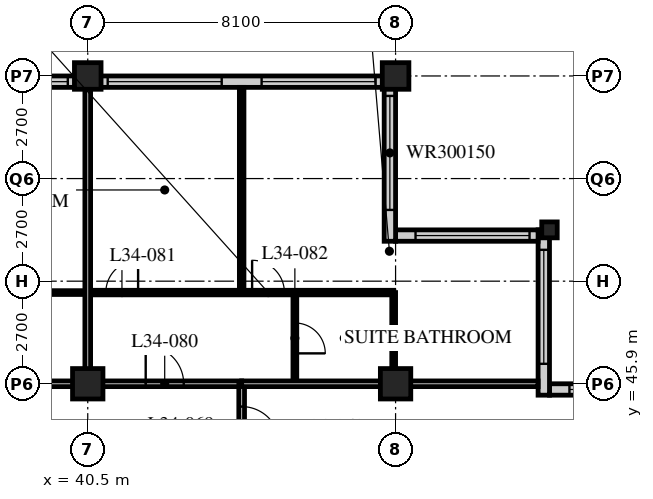
"""IFC4 building model, lengths in metres.
Left out: names, types, materials, properties, quantities, classifications, styles, units other than length and angle.
Written with IfcOpenShell. Run it as: python <this file> out.ifc"""

import sys

from ifc_helpers import new_model, si_unit, direction, frame, frame_2d, origin, origin_2d, place, context, subcontext, project, spatial, rectangle, hollow_rectangle, i_section, extrude, element, fill, save


model = new_model("IFC4")
c1 = context("Model", 3, precision=1e-05, world=origin(), true_north=direction((0.0, 1.0)))
c2 = subcontext(c1, "Body", "Model", "MODEL_VIEW")
j1 = project(units=[si_unit("LENGTHUNIT", "METRE"), si_unit("PLANEANGLEUNIT", "RADIAN")], contexts=[c1])
p1 = place(None, origin())
s1 = spatial("IfcSite", under=j1, at=p1, CompositionType="ELEMENT")
p2 = place(p1, origin())
s2 = spatial("IfcBuilding", under=s1, at=p2, CompositionType="ELEMENT")
p3 = place(p2, frame((0.0, 0.0, 134.0)))
s3 = spatial("IfcBuildingStorey", under=s2, at=p3, CompositionType="ELEMENT", Elevation=134.0)
p4 = place(p3, frame((40.5, 45.9, 0.0), z_axis=(0.0, 0.0, 1.0), x_axis=(1.0, 0.0, 0.0)))
e1 = element("IfcColumn", 1, at=p4, inside=s3, PredefinedType="COLUMN", context=c2, shape_type="SweptSolid", body=[
    extrude(hollow_rectangle(XDim=0.8, YDim=0.8, WallThickness=0.08, at=origin_2d()), origin(), (0.0, 0.0, 1.0), 3.4),
])
p5 = place(p3, frame((40.5, 54.0, 0.0), z_axis=(0.0, 0.0, 1.0), x_axis=(1.0, 0.0, 0.0)))
e2 = element("IfcColumn", 2, at=p5, inside=s3, PredefinedType="COLUMN", context=c2, shape_type="SweptSolid", body=[
    extrude(hollow_rectangle(XDim=0.7, YDim=0.7, WallThickness=0.07, at=origin_2d()), origin(), (0.0, 0.0, 1.0), 3.4),
])
p6 = place(p3, frame((48.6, 45.9, 0.0), z_axis=(0.0, 0.0, 1.0), x_axis=(1.0, 0.0, 0.0)))
e3 = element("IfcColumn", 3, at=p6, inside=s3, PredefinedType="COLUMN", context=c2, shape_type="SweptSolid", body=[
    extrude(hollow_rectangle(XDim=0.8, YDim=0.8, WallThickness=0.08, at=origin_2d()), origin(), (0.0, 0.0, 1.0), 3.4),
])
p7 = place(p3, frame((48.6, 54.0, 0.0), z_axis=(0.0, 0.0, 1.0), x_axis=(1.0, 0.0, 0.0)))
e4 = element("IfcColumn", 4, at=p7, inside=s3, PredefinedType="COLUMN", context=c2, shape_type="SweptSolid", body=[
    extrude(hollow_rectangle(XDim=0.7, YDim=0.7, WallThickness=0.07, at=origin_2d()), origin(), (0.0, 0.0, 1.0), 3.4),
])
p8 = place(p3, frame((52.65, 49.95, 0.0), z_axis=(0.0, 0.0, 1.0), x_axis=(1.0, 0.0, 0.0)))
e5 = element("IfcColumn", 5, at=p8, inside=s3, PredefinedType="COLUMN", context=c2, shape_type="SweptSolid", body=[
    extrude(i_section(OverallWidth=0.407, OverallDepth=0.419, WebThickness=0.031, FlangeThickness=0.049, FilletRadius=0.015, at=origin_2d()), origin(), (0.0, 0.0, 1.0), 3.4),
])
p9 = place(p3, frame((56.4, 45.75, 0.0), z_axis=(0.0, 0.0, 1.0), x_axis=(-1.0, 0.0, 0.0)))
e6 = element("IfcWall", 6, at=p9, inside=s3, PredefinedType="SOLIDWALL", context=c2, shape_type="SweptSolid", body=[
    extrude(rectangle(XDim=3.75, YDim=0.3, at=frame_2d((1.875, 0.0))), origin(), (0.0, 0.0, 1.0), 3.19),
])
p10 = place(p9, frame((0.225, 0.0, 0.9)))
e7 = element("IfcOpeningElement", 7, at=p10, cuts=e6, PredefinedType="OPENING", context=c2, shape_type="SweptSolid", body=[
    extrude(rectangle(XDim=3.0, YDim=1.5, at=frame_2d((1.5, 0.75))), frame((0.0, 0.16, 0.0), z_axis=(0.0, -1.0, 0.0), x_axis=(1.0, 0.0, 0.0)), (0.0, 0.0, 1.0), 0.32),
])
p11 = place(p3, frame((52.5, 45.6, 0.0), z_axis=(0.0, 0.0, 1.0), x_axis=(0.0, 1.0, 0.0)))
e8 = element("IfcWall", 8, at=p11, inside=s3, PredefinedType="SOLIDWALL", context=c2, shape_type="SweptSolid", body=[
    extrude(rectangle(XDim=4.35, YDim=0.3, at=frame_2d((2.175, 0.0))), origin(), (0.0, 0.0, 1.0), 3.19),
])
p12 = place(p11, frame((0.825, 0.0, 0.9)))
e9 = element("IfcOpeningElement", 9, at=p12, cuts=e8, PredefinedType="OPENING", context=c2, shape_type="SweptSolid", body=[
    extrude(rectangle(XDim=3.0, YDim=1.5, at=frame_2d((1.5, 0.75))), frame((0.0, 0.16, 0.0), z_axis=(0.0, -1.0, 0.0), x_axis=(1.0, 0.0, 0.0)), (0.0, 0.0, 1.0), 0.32),
])
p13 = place(p3, frame((52.35, 49.8, 0.0), z_axis=(0.0, 0.0, 1.0), x_axis=(-1.0, 0.0, 0.0)))
e10 = element("IfcWall", 10, at=p13, inside=s3, PredefinedType="SOLIDWALL", context=c2, shape_type="SweptSolid", body=[
    extrude(rectangle(XDim=3.75, YDim=0.3, at=frame_2d((1.875, 0.0))), origin(), (0.0, 0.0, 1.0), 3.19),
])
p14 = place(p13, frame((0.225, 0.0, 0.9)))
e11 = element("IfcOpeningElement", 11, at=p14, cuts=e10, PredefinedType="OPENING", context=c2, shape_type="SweptSolid", body=[
    extrude(rectangle(XDim=3.0, YDim=1.5, at=frame_2d((1.5, 0.75))), frame((0.0, 0.16, 0.0), z_axis=(0.0, -1.0, 0.0), x_axis=(1.0, 0.0, 0.0)), (0.0, 0.0, 1.0), 0.32),
])
p15 = place(p3, frame((48.45, 49.65, 0.0), z_axis=(0.0, 0.0, 1.0), x_axis=(0.0, 1.0, 0.0)))
e12 = element("IfcWall", 12, at=p15, inside=s3, PredefinedType="SOLIDWALL", context=c2, shape_type="SweptSolid", body=[
    extrude(rectangle(XDim=4.35, YDim=0.3, at=frame_2d((2.175, 0.0))), origin(), (0.0, 0.0, 1.0), 3.19),
])
p16 = place(p15, frame((0.825, 0.0, 0.9)))
e13 = element("IfcOpeningElement", 13, at=p16, cuts=e12, PredefinedType="OPENING", context=c2, shape_type="SweptSolid", body=[
    extrude(rectangle(XDim=3.0, YDim=1.5, at=frame_2d((1.5, 0.75))), frame((0.0, 0.16, 0.0), z_axis=(0.0, -1.0, 0.0), x_axis=(1.0, 0.0, 0.0)), (0.0, 0.0, 1.0), 0.32),
])
p17 = place(p3, frame((48.3, 53.85, 0.0), z_axis=(0.0, 0.0, 1.0), x_axis=(-1.0, 0.0, 0.0)))
e14 = element("IfcWall", 14, at=p17, inside=s3, PredefinedType="SOLIDWALL", context=c2, shape_type="SweptSolid", body=[
    extrude(rectangle(XDim=40.2, YDim=0.3, at=frame_2d((20.1, 0.0))), origin(), (0.0, 0.0, 1.0), 3.19),
])
p18 = place(p17, frame((0.225, 0.0, 0.9)))
e15 = element("IfcOpeningElement", 15, at=p18, cuts=e14, PredefinedType="OPENING", context=c2, shape_type="SweptSolid", body=[
    extrude(rectangle(XDim=3.0, YDim=2.0, at=frame_2d((1.5, 1.0))), frame((0.0, 0.16, 0.0), z_axis=(0.0, -1.0, 0.0), x_axis=(1.0, 0.0, 0.0)), (0.0, 0.0, 1.0), 0.32),
])
p19 = place(p17, frame((4.275, 0.0, 0.9)))
e16 = element("IfcOpeningElement", 16, at=p19, cuts=e14, PredefinedType="OPENING", context=c2, shape_type="SweptSolid", body=[
    extrude(rectangle(XDim=3.0, YDim=2.0, at=frame_2d((1.5, 1.0))), frame((0.0, 0.16, 0.0), z_axis=(0.0, -1.0, 0.0), x_axis=(1.0, 0.0, 0.0)), (0.0, 0.0, 1.0), 0.32),
])
p20 = place(p17, frame((8.325, 0.0, 0.9)))
e17 = element("IfcOpeningElement", 17, at=p20, cuts=e14, PredefinedType="OPENING", context=c2, shape_type="SweptSolid", body=[
    extrude(rectangle(XDim=3.0, YDim=2.0, at=frame_2d((1.5, 1.0))), frame((0.0, 0.16, 0.0), z_axis=(0.0, -1.0, 0.0), x_axis=(1.0, 0.0, 0.0)), (0.0, 0.0, 1.0), 0.32),
])
p21 = place(p17, frame((12.375, 0.0, 0.9)))
e18 = element("IfcOpeningElement", 18, at=p21, cuts=e14, PredefinedType="OPENING", context=c2, shape_type="SweptSolid", body=[
    extrude(rectangle(XDim=3.0, YDim=2.0, at=frame_2d((1.5, 1.0))), frame((0.0, 0.16, 0.0), z_axis=(0.0, -1.0, 0.0), x_axis=(1.0, 0.0, 0.0)), (0.0, 0.0, 1.0), 0.32),
])
p22 = place(p17, frame((16.425, 0.0, 0.9)))
e19 = element("IfcOpeningElement", 19, at=p22, cuts=e14, PredefinedType="OPENING", context=c2, shape_type="SweptSolid", body=[
    extrude(rectangle(XDim=3.0, YDim=2.0, at=frame_2d((1.5, 1.0))), frame((0.0, 0.16, 0.0), z_axis=(0.0, -1.0, 0.0), x_axis=(1.0, 0.0, 0.0)), (0.0, 0.0, 1.0), 0.32),
])
p23 = place(p17, frame((20.475, 0.0, 0.9)))
e20 = element("IfcOpeningElement", 20, at=p23, cuts=e14, PredefinedType="OPENING", context=c2, shape_type="SweptSolid", body=[
    extrude(rectangle(XDim=3.0, YDim=2.0, at=frame_2d((1.5, 1.0))), frame((0.0, 0.16, 0.0), z_axis=(0.0, -1.0, 0.0), x_axis=(1.0, 0.0, 0.0)), (0.0, 0.0, 1.0), 0.32),
])
p24 = place(p17, frame((24.525, 0.0, 0.9)))
e21 = element("IfcOpeningElement", 21, at=p24, cuts=e14, PredefinedType="OPENING", context=c2, shape_type="SweptSolid", body=[
    extrude(rectangle(XDim=3.0, YDim=2.0, at=frame_2d((1.5, 1.0))), frame((0.0, 0.16, 0.0), z_axis=(0.0, -1.0, 0.0), x_axis=(1.0, 0.0, 0.0)), (0.0, 0.0, 1.0), 0.32),
])
p25 = place(p17, frame((28.575, 0.0, 0.9)))
e22 = element("IfcOpeningElement", 22, at=p25, cuts=e14, PredefinedType="OPENING", context=c2, shape_type="SweptSolid", body=[
    extrude(rectangle(XDim=3.0, YDim=2.0, at=frame_2d((1.5, 1.0))), frame((0.0, 0.16, 0.0), z_axis=(0.0, -1.0, 0.0), x_axis=(1.0, 0.0, 0.0)), (0.0, 0.0, 1.0), 0.32),
])
p26 = place(p17, frame((32.625, 0.0, 0.9)))
e23 = element("IfcOpeningElement", 23, at=p26, cuts=e14, PredefinedType="OPENING", context=c2, shape_type="SweptSolid", body=[
    extrude(rectangle(XDim=3.0, YDim=2.0, at=frame_2d((1.5, 1.0))), frame((0.0, 0.16, 0.0), z_axis=(0.0, -1.0, 0.0), x_axis=(1.0, 0.0, 0.0)), (0.0, 0.0, 1.0), 0.32),
])
p27 = place(p17, frame((36.675, 0.0, 0.9)))
e24 = element("IfcOpeningElement", 24, at=p27, cuts=e14, PredefinedType="OPENING", context=c2, shape_type="SweptSolid", body=[
    extrude(rectangle(XDim=3.0, YDim=2.0, at=frame_2d((1.5, 1.0))), frame((0.0, 0.16, 0.0), z_axis=(0.0, -1.0, 0.0), x_axis=(1.0, 0.0, 0.0)), (0.0, 0.0, 1.0), 0.32),
])
p28 = place(p3, frame((8.1, 45.9, 0.0), z_axis=(0.0, 0.0, 1.0), x_axis=(1.0, 0.0, 0.0)))
e25 = element("IfcWall", 25, at=p28, inside=s3, PredefinedType="PARTITIONING", context=c2, shape_type="SweptSolid", body=[
    extrude(rectangle(XDim=36.45, YDim=0.15, at=frame_2d((18.225, 0.0))), origin(), (0.0, 0.0, 1.0), 2.578),
])
p29 = place(p28, frame((9.625, 0.0, 0.0)))
e26 = element("IfcOpeningElement", 26, at=p29, cuts=e25, PredefinedType="OPENING", context=c2, shape_type="SweptSolid", body=[
    extrude(rectangle(XDim=1.0, YDim=2.1, at=frame_2d((0.5, 1.05))), frame((0.0, 0.085, 0.0), z_axis=(0.0, -1.0, 0.0), x_axis=(1.0, 0.0, 0.0)), (0.0, 0.0, 1.0), 0.17),
])
p30 = place(p28, frame((21.775, 0.0, 0.0)))
e27 = element("IfcOpeningElement", 27, at=p30, cuts=e25, PredefinedType="OPENING", context=c2, shape_type="SweptSolid", body=[
    extrude(rectangle(XDim=1.0, YDim=2.1, at=frame_2d((0.5, 1.05))), frame((0.0, 0.085, 0.0), z_axis=(0.0, -1.0, 0.0), x_axis=(1.0, 0.0, 0.0)), (0.0, 0.0, 1.0), 0.17),
])
p31 = place(p28, frame((28.95, 0.0, 0.0)))
e28 = element("IfcOpeningElement", 28, at=p31, cuts=e25, PredefinedType="OPENING", context=c2, shape_type="SweptSolid", body=[
    extrude(rectangle(XDim=1.0, YDim=2.1, at=frame_2d((0.5, 1.05))), frame((0.0, 0.085, 0.0), z_axis=(0.0, -1.0, 0.0), x_axis=(1.0, 0.0, 0.0)), (0.0, 0.0, 1.0), 0.17),
])
p32 = place(p28, frame((33.925, 0.0, 0.0)))
e29 = element("IfcOpeningElement", 29, at=p32, cuts=e25, PredefinedType="OPENING", context=c2, shape_type="SweptSolid", body=[
    extrude(rectangle(XDim=1.0, YDim=2.1, at=frame_2d((0.5, 1.05))), frame((0.0, 0.085, 0.0), z_axis=(0.0, -1.0, 0.0), x_axis=(1.0, 0.0, 0.0)), (0.0, 0.0, 1.0), 0.17),
])
p33 = place(p28, frame((2.625, 0.0, 0.0)))
e30 = element("IfcOpeningElement", 30, at=p33, cuts=e25, PredefinedType="OPENING", context=c2, shape_type="SweptSolid", body=[
    extrude(rectangle(XDim=1.0, YDim=2.1, at=frame_2d((0.5, 1.05))), frame((0.0, 0.085, 0.0), z_axis=(0.0, -1.0, 0.0), x_axis=(1.0, 0.0, 0.0)), (0.0, 0.0, 1.0), 0.17),
])
p34 = place(p3, frame((44.55, 17.55, 0.0), z_axis=(0.0, 0.0, 1.0), x_axis=(0.0, 1.0, 0.0)))
e31 = element("IfcWall", 31, at=p34, inside=s3, PredefinedType="PARTITIONING", context=c2, shape_type="SweptSolid", body=[
    extrude(rectangle(XDim=28.35, YDim=0.15, at=frame_2d((14.175, 0.0))), origin(), (0.0, 0.0, 1.0), 3.19),
])
p35 = place(p34, frame((2.75, 0.0, 0.0)))
e32 = element("IfcOpeningElement", 32, at=p35, cuts=e31, PredefinedType="OPENING", context=c2, shape_type="SweptSolid", body=[
    extrude(rectangle(XDim=1.0, YDim=2.1, at=frame_2d((0.5, 1.05))), frame((0.0, 0.085, 0.0), z_axis=(0.0, -1.0, 0.0), x_axis=(1.0, 0.0, 0.0)), (0.0, 0.0, 1.0), 0.17),
])
p36 = place(p34, frame((6.5, 0.0, 0.0)))
e33 = element("IfcOpeningElement", 33, at=p36, cuts=e31, PredefinedType="OPENING", context=c2, shape_type="SweptSolid", body=[
    extrude(rectangle(XDim=1.0, YDim=2.1, at=frame_2d((0.5, 1.05))), frame((0.0, 0.085, 0.0), z_axis=(0.0, -1.0, 0.0), x_axis=(1.0, 0.0, 0.0)), (0.0, 0.0, 1.0), 0.17),
])
p37 = place(p34, frame((13.55, 0.0, 0.0)))
e34 = element("IfcOpeningElement", 34, at=p37, cuts=e31, PredefinedType="OPENING", context=c2, shape_type="SweptSolid", body=[
    extrude(rectangle(XDim=1.0, YDim=2.1, at=frame_2d((0.5, 1.05))), frame((0.0, 0.085, 0.0), z_axis=(0.0, -1.0, 0.0), x_axis=(1.0, 0.0, 0.0)), (0.0, 0.0, 1.0), 0.17),
])
p38 = place(p34, frame((18.1, 0.0, 0.0)))
e35 = element("IfcOpeningElement", 35, at=p38, cuts=e31, PredefinedType="OPENING", context=c2, shape_type="SweptSolid", body=[
    extrude(rectangle(XDim=1.0, YDim=2.1, at=frame_2d((0.5, 1.05))), frame((0.0, 0.085, 0.0), z_axis=(0.0, -1.0, 0.0), x_axis=(1.0, 0.0, 0.0)), (0.0, 0.0, 1.0), 0.17),
])
p39 = place(p34, frame((26.75, 0.0, 0.0)))
e36 = element("IfcOpeningElement", 36, at=p39, cuts=e31, PredefinedType="OPENING", context=c2, shape_type="SweptSolid", body=[
    extrude(rectangle(XDim=1.0, YDim=2.1, at=frame_2d((0.5, 1.05))), frame((0.0, 0.085, 0.0), z_axis=(0.0, -1.0, 0.0), x_axis=(1.0, 0.0, 0.0)), (0.0, 0.0, 1.0), 0.17),
])
p40 = place(p3, frame((38.2, 48.3, 0.0), z_axis=(0.0, 0.0, 1.0), x_axis=(1.0, 0.0, 0.0)))
e37 = element("IfcWall", 37, at=p40, inside=s3, PredefinedType="PARTITIONING", context=c2, shape_type="SweptSolid", body=[
    extrude(rectangle(XDim=2.3, YDim=0.1, at=frame_2d((1.15, 0.0))), origin(), (0.0, 0.0, 1.0), 3.19),
])
p41 = place(p3, frame((40.5, 48.3, 0.0), z_axis=(0.0, 0.0, 1.0), x_axis=(1.0, 0.0, 0.0)))
e38 = element("IfcWall", 38, at=p41, inside=s3, PredefinedType="PARTITIONING", context=c2, shape_type="SweptSolid", body=[
    extrude(rectangle(XDim=8.05, YDim=0.12, at=frame_2d((4.025, 0.0))), origin(), (0.0, 0.0, 1.0), 3.19),
])
p42 = place(p41, frame((0.475, 0.0, 0.0)))
e39 = element("IfcOpeningElement", 39, at=p42, cuts=e38, PredefinedType="OPENING", context=c2, shape_type="SweptSolid", body=[
    extrude(rectangle(XDim=0.85, YDim=2.1, at=frame_2d((0.425, 1.05))), frame((0.0, 0.07, 0.0), z_axis=(0.0, -1.0, 0.0), x_axis=(1.0, 0.0, 0.0)), (0.0, 0.0, 1.0), 0.14),
])
p43 = place(p41, frame((4.325, 0.0, 0.0)))
e40 = element("IfcOpeningElement", 40, at=p43, cuts=e38, PredefinedType="OPENING", context=c2, shape_type="SweptSolid", body=[
    extrude(rectangle(XDim=0.85, YDim=2.1, at=frame_2d((0.425, 1.05))), frame((0.0, 0.07, 0.0), z_axis=(0.0, -1.0, 0.0), x_axis=(1.0, 0.0, 0.0)), (0.0, 0.0, 1.0), 0.14),
])
p44 = place(p3, frame((45.95, 45.9, 0.0), z_axis=(0.0, 0.0, 1.0), x_axis=(0.0, 1.0, 0.0)))
e41 = element("IfcWall", 41, at=p44, inside=s3, PredefinedType="PARTITIONING", context=c2, shape_type="SweptSolid", body=[
    extrude(rectangle(XDim=2.4, YDim=0.1, at=frame_2d((1.2, 0.0))), origin(), (0.0, 0.0, 1.0), 3.19),
])
p45 = place(p44, frame((0.8, 0.0, 0.0)))
e42 = element("IfcOpeningElement", 42, at=p45, cuts=e41, PredefinedType="OPENING", context=c2, shape_type="SweptSolid", body=[
    extrude(rectangle(XDim=0.8, YDim=2.1, at=frame_2d((0.4, 1.05))), frame((0.0, 0.06, 0.0), z_axis=(0.0, -1.0, 0.0), x_axis=(1.0, 0.0, 0.0)), (0.0, 0.0, 1.0), 0.12),
])
p46 = place(p3, frame((48.55, 45.9, 0.0), z_axis=(0.0, 0.0, 1.0), x_axis=(0.0, 1.0, 0.0)))
e43 = element("IfcWall", 43, at=p46, inside=s3, PredefinedType="PARTITIONING", context=c2, shape_type="SweptSolid", body=[
    extrude(rectangle(XDim=2.4, YDim=0.1, at=frame_2d((1.2, 0.0))), origin(), (0.0, 0.0, 1.0), 2.578),
])
p47 = place(p3, frame((44.55, 48.3, 0.0), z_axis=(0.0, 0.0, 1.0), x_axis=(0.0, 1.0, 0.0)))
e44 = element("IfcWall", 44, at=p47, inside=s3, PredefinedType="PARTITIONING", context=c2, shape_type="SweptSolid", body=[
    extrude(rectangle(XDim=5.4, YDim=0.12, at=frame_2d((2.7, 0.0))), origin(), (0.0, 0.0, 1.0), 3.19),
])
for number, where, z_axis, x_axis in (
    (45, (44.55, 45.9, 0.0), (0.0, 0.0, 1.0), (1.0, 0.0, 0.0)),
    (46, (40.5, 45.9, 0.0), (0.0, 0.0, 1.0), (0.0, 1.0, 0.0)),
):
    element("IfcWall", number, at=place(p3, frame(where, z_axis=z_axis, x_axis=x_axis)), inside=s3, PredefinedType="PARTITIONING", context=c2, shape_type="SweptSolid", body=[
        extrude(rectangle(XDim=7.8, YDim=0.15, at=frame_2d((3.9, 0.0))), origin(), (0.0, 0.0, 1.0), 2.578),
    ])
p48 = place(p10, origin())
e47 = element("IfcWindow", 47, at=p48, inside=s3, PartitioningType="SINGLE_PANEL", PredefinedType="WINDOW", context=c2, shape_type="SweptSolid", body=[
    extrude(rectangle(XDim=3.0, YDim=1.5, at=frame_2d((1.5, 0.75))), frame((0.0, 0.03, 0.0), z_axis=(0.0, -1.0, 0.0), x_axis=(1.0, 0.0, 0.0)), (0.0, 0.0, 1.0), 0.06),
])
fill(e7, e47)
p49 = place(p12, origin())
e48 = element("IfcWindow", 48, at=p49, inside=s3, PartitioningType="SINGLE_PANEL", PredefinedType="WINDOW", context=c2, shape_type="SweptSolid", body=[
    extrude(rectangle(XDim=3.0, YDim=1.5, at=frame_2d((1.5, 0.75))), frame((0.0, 0.03, 0.0), z_axis=(0.0, -1.0, 0.0), x_axis=(1.0, 0.0, 0.0)), (0.0, 0.0, 1.0), 0.06),
])
fill(e9, e48)
p50 = place(p14, origin())
e49 = element("IfcWindow", 49, at=p50, inside=s3, PartitioningType="SINGLE_PANEL", PredefinedType="WINDOW", context=c2, shape_type="SweptSolid", body=[
    extrude(rectangle(XDim=3.0, YDim=1.5, at=frame_2d((1.5, 0.75))), frame((0.0, 0.03, 0.0), z_axis=(0.0, -1.0, 0.0), x_axis=(1.0, 0.0, 0.0)), (0.0, 0.0, 1.0), 0.06),
])
fill(e11, e49)
p51 = place(p16, origin())
e50 = element("IfcWindow", 50, at=p51, inside=s3, PartitioningType="SINGLE_PANEL", PredefinedType="WINDOW", context=c2, shape_type="SweptSolid", body=[
    extrude(rectangle(XDim=3.0, YDim=1.5, at=frame_2d((1.5, 0.75))), frame((0.0, 0.03, 0.0), z_axis=(0.0, -1.0, 0.0), x_axis=(1.0, 0.0, 0.0)), (0.0, 0.0, 1.0), 0.06),
])
fill(e13, e50)
p52 = place(p18, origin())
e51 = element("IfcWindow", 51, at=p52, inside=s3, PartitioningType="SINGLE_PANEL", PredefinedType="WINDOW", context=c2, shape_type="SweptSolid", body=[
    extrude(rectangle(XDim=3.0, YDim=2.0, at=frame_2d((1.5, 1.0))), frame((0.0, 0.03, 0.0), z_axis=(0.0, -1.0, 0.0), x_axis=(1.0, 0.0, 0.0)), (0.0, 0.0, 1.0), 0.06),
])
fill(e15, e51)
p53 = place(p19, origin())
e52 = element("IfcWindow", 52, at=p53, inside=s3, PartitioningType="SINGLE_PANEL", PredefinedType="WINDOW", context=c2, shape_type="SweptSolid", body=[
    extrude(rectangle(XDim=3.0, YDim=2.0, at=frame_2d((1.5, 1.0))), frame((0.0, 0.03, 0.0), z_axis=(0.0, -1.0, 0.0), x_axis=(1.0, 0.0, 0.0)), (0.0, 0.0, 1.0), 0.06),
])
fill(e16, e52)
p54 = place(p20, origin())
e53 = element("IfcWindow", 53, at=p54, inside=s3, PartitioningType="SINGLE_PANEL", PredefinedType="WINDOW", context=c2, shape_type="SweptSolid", body=[
    extrude(rectangle(XDim=3.0, YDim=2.0, at=frame_2d((1.5, 1.0))), frame((0.0, 0.03, 0.0), z_axis=(0.0, -1.0, 0.0), x_axis=(1.0, 0.0, 0.0)), (0.0, 0.0, 1.0), 0.06),
])
fill(e17, e53)
p55 = place(p39, origin())
e54 = element("IfcDoor", 54, at=p55, inside=s3, OperationType="SINGLE_SWING_RIGHT", PredefinedType="DOOR", context=c2, shape_type="SweptSolid", body=[
    extrude(rectangle(XDim=1.0, YDim=2.1, at=frame_2d((0.5, 1.05))), frame((0.0, 0.025, 0.0), z_axis=(0.0, -1.0, 0.0), x_axis=(1.0, 0.0, 0.0)), (0.0, 0.0, 1.0), 0.05),
])
fill(e36, e54)
p56 = place(p32, origin())
e55 = element("IfcDoor", 55, at=p56, inside=s3, OperationType="SINGLE_SWING_LEFT", PredefinedType="DOOR", context=c2, shape_type="SweptSolid", body=[
    extrude(rectangle(XDim=1.0, YDim=2.1, at=frame_2d((0.5, 1.05))), frame((0.0, 0.025, 0.0), z_axis=(0.0, -1.0, 0.0), x_axis=(1.0, 0.0, 0.0)), (0.0, 0.0, 1.0), 0.05),
])
fill(e29, e55)
p57 = place(p42, origin())
e56 = element("IfcDoor", 56, at=p57, inside=s3, OperationType="SINGLE_SWING_RIGHT", PredefinedType="DOOR", context=c2, shape_type="SweptSolid", body=[
    extrude(rectangle(XDim=0.85, YDim=2.1, at=frame_2d((0.425, 1.05))), frame((0.0, 0.025, 0.0), z_axis=(0.0, -1.0, 0.0), x_axis=(1.0, 0.0, 0.0)), (0.0, 0.0, 1.0), 0.05),
])
fill(e39, e56)
p58 = place(p45, origin())
e57 = element("IfcDoor", 57, at=p58, inside=s3, OperationType="SINGLE_SWING_RIGHT", PredefinedType="DOOR", context=c2, shape_type="SweptSolid", body=[
    extrude(rectangle(XDim=0.8, YDim=2.1, at=frame_2d((0.4, 1.05))), frame((0.0, 0.025, 0.0), z_axis=(0.0, -1.0, 0.0), x_axis=(1.0, 0.0, 0.0)), (0.0, 0.0, 1.0), 0.05),
])
fill(e42, e57)
p59 = place(p43, origin())
e58 = element("IfcDoor", 58, at=p59, inside=s3, OperationType="SINGLE_SWING_LEFT", PredefinedType="DOOR", context=c2, shape_type="SweptSolid", body=[
    extrude(rectangle(XDim=0.85, YDim=2.1, at=frame_2d((0.425, 1.05))), frame((0.0, 0.025, 0.0), z_axis=(0.0, -1.0, 0.0), x_axis=(1.0, 0.0, 0.0)), (0.0, 0.0, 1.0), 0.05),
])
fill(e40, e58)
save(model, sys.argv[1])
